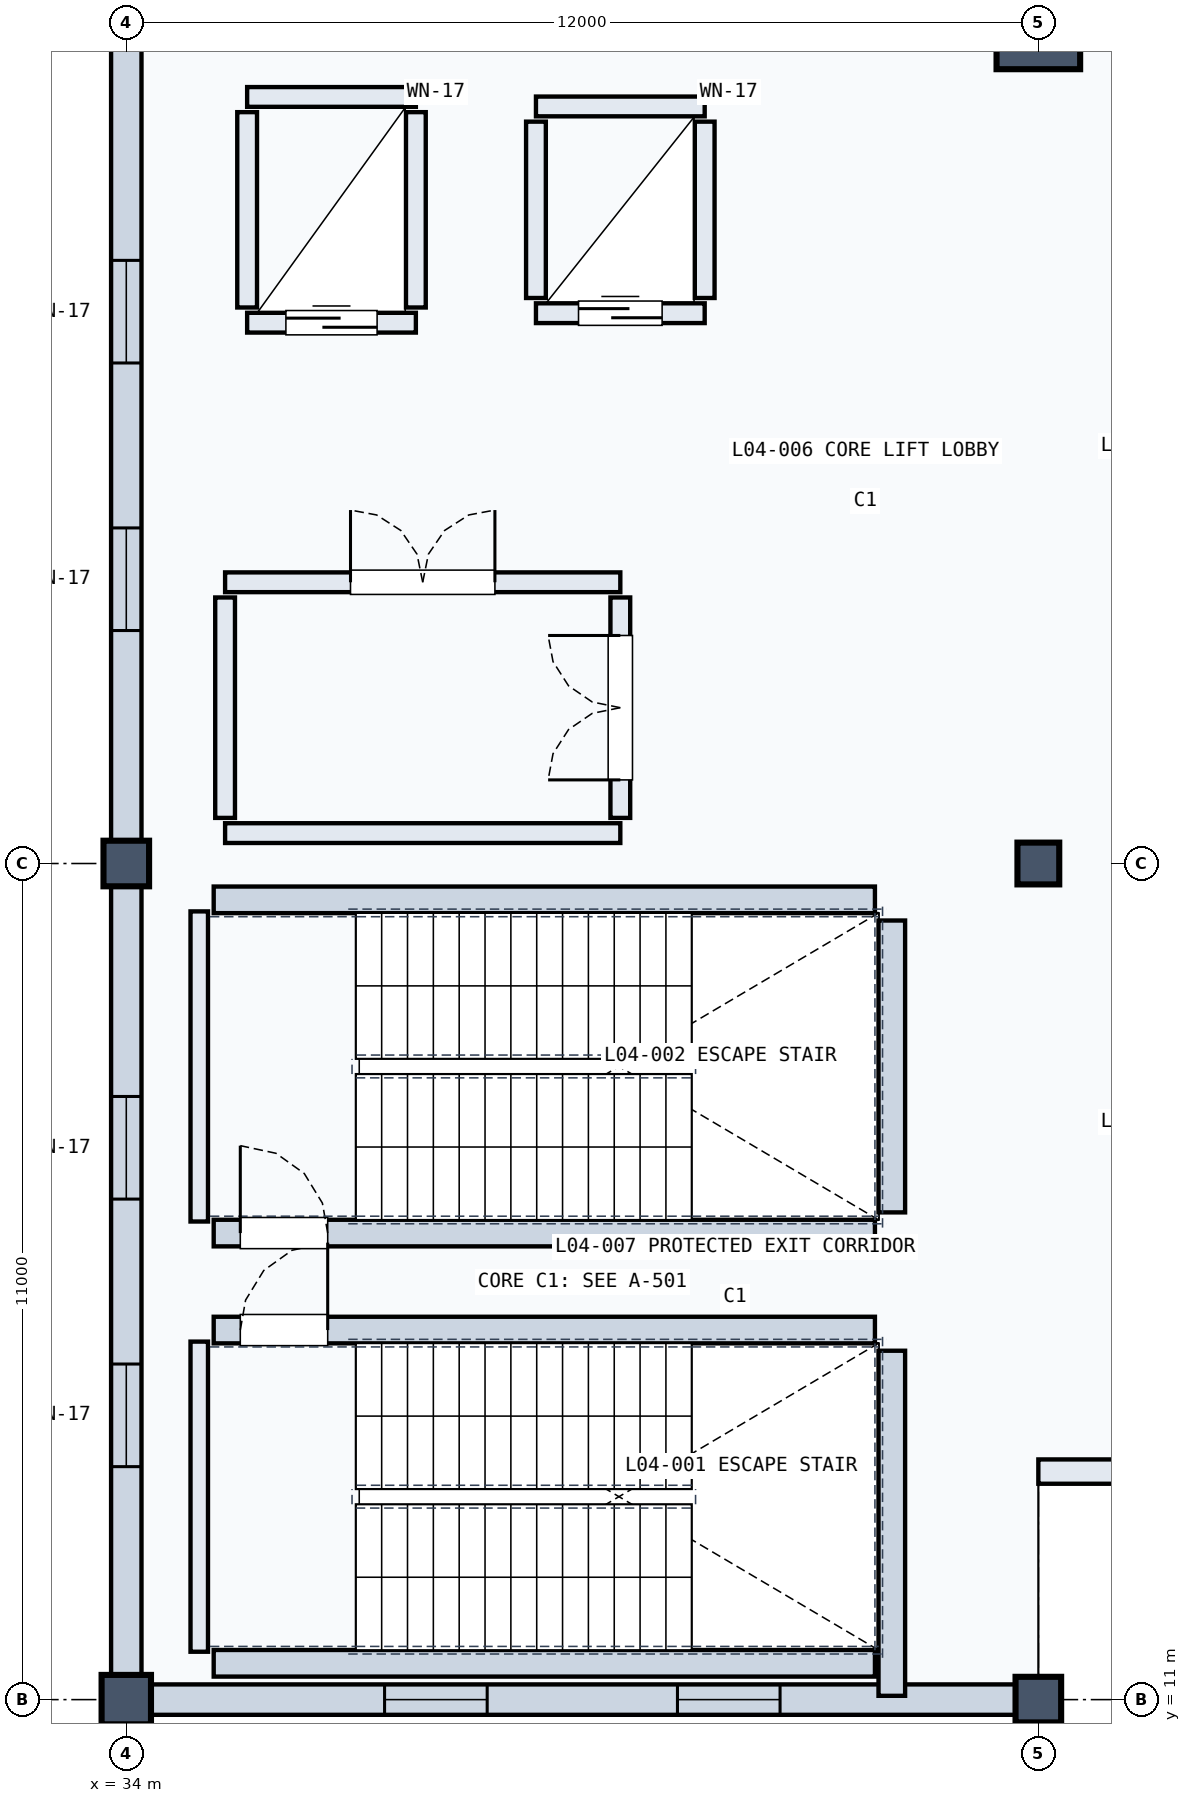
"""IFC4 building model, lengths in metres.
Left out: names, types, materials, properties, quantities, classifications, styles, units other than length and angle.
Written with IfcOpenShell. Run it as: python <this file> out.ifc"""

import sys

from ifc_helpers import new_model, si_unit, direction, frame, frame_2d, origin, origin_2d, place, context, subcontext, project, spatial, rectangle, extrude, element, fill, save


model = new_model("IFC4")
c1 = context("Model", 3, precision=1e-05, world=origin(), true_north=direction((0.0, 1.0)))
c2 = subcontext(c1, "Body", "Model", "MODEL_VIEW")
j1 = project(units=[si_unit("LENGTHUNIT", "METRE"), si_unit("PLANEANGLEUNIT", "RADIAN")], contexts=[c1])
p1 = place(None, origin())
s1 = spatial("IfcSite", under=j1, at=p1, CompositionType="ELEMENT")
p2 = place(p1, origin())
s2 = spatial("IfcBuilding", under=s1, at=p2, CompositionType="ELEMENT")
p3 = place(p2, frame((0.0, 0.0, 19.5)))
s3 = spatial("IfcBuildingStorey", under=s2, at=p3, CompositionType="ELEMENT", Elevation=19.5)
p4 = place(p3, frame((34.0, 11.0, 0.0), z_axis=(0.0, 0.0, 1.0), x_axis=(1.0, 0.0, 0.0)))
e1 = element("IfcColumn", 1, at=p4, inside=s3, PredefinedType="COLUMN", context=c2, shape_type="SweptSolid", body=[
    extrude(rectangle(XDim=0.65, YDim=0.65, at=origin_2d()), origin(), (0.0, 0.0, 1.0), 4.8),
])
for number, where, z_axis, x_axis in (
    (2, (34.0, 22.0, 0.0), (0.0, 0.0, 1.0), (1.0, 0.0, 0.0)),
    (3, (46.0, 11.0, 0.0), (0.0, 0.0, 1.0), (1.0, 0.0, 0.0)),
):
    element("IfcColumn", number, at=place(p3, frame(where, z_axis=z_axis, x_axis=x_axis)), inside=s3, PredefinedType="COLUMN", context=c2, shape_type="SweptSolid", body=[
        extrude(rectangle(XDim=0.6, YDim=0.6, at=origin_2d()), origin(), (0.0, 0.0, 1.0), 4.8),
    ])
p5 = place(p3, frame((46.0, 22.0, 0.0), z_axis=(0.0, 0.0, 1.0), x_axis=(1.0, 0.0, 0.0)))
e4 = element("IfcColumn", 4, at=p5, inside=s3, PredefinedType="COLUMN", context=c2, shape_type="SweptSolid", body=[
    extrude(rectangle(XDim=0.55, YDim=0.55, at=origin_2d()), origin(), (0.0, 0.0, 1.0), 4.8),
])
p6 = place(p3, frame((46.0, 33.0, 0.0), z_axis=(0.0, 0.0, 1.0), x_axis=(1.0, 0.0, 0.0)))
e5 = element("IfcColumn", 5, at=p6, inside=s3, PredefinedType="COLUMN", context=c2, shape_type="SweptSolid", body=[
    extrude(rectangle(XDim=1.1, YDim=1.1, at=origin_2d()), origin(), (0.0, 0.0, 1.0), 4.8),
])
p7 = place(p3, frame((34.22, 11.0, 0.0), z_axis=(0.0, 0.0, 1.0), x_axis=(1.0, 0.0, 0.0)))
e6 = element("IfcWall", 6, at=p7, inside=s3, PredefinedType="SOLIDWALL", context=c2, shape_type="SweptSolid", body=[
    extrude(rectangle(XDim=11.56, YDim=0.4, at=frame_2d((5.78, 0.0))), origin(), (0.0, 0.0, 1.0), 3.707),
])
p8 = place(p7, frame((3.178, 0.0, 0.8)))
e7 = element("IfcOpeningElement", 7, at=p8, cuts=e6, PredefinedType="OPENING", context=c2, shape_type="SweptSolid", body=[
    extrude(rectangle(XDim=1.35, YDim=2.1, at=frame_2d((0.675, 1.05))), frame((0.0, 0.21, 0.0), z_axis=(0.0, -1.0, 0.0), x_axis=(1.0, 0.0, 0.0)), (0.0, 0.0, 1.0), 0.42),
])
p9 = place(p7, frame((7.032, 0.0, 0.8)))
e8 = element("IfcOpeningElement", 8, at=p9, cuts=e6, PredefinedType="OPENING", context=c2, shape_type="SweptSolid", body=[
    extrude(rectangle(XDim=1.35, YDim=2.1, at=frame_2d((0.675, 1.05))), frame((0.0, 0.21, 0.0), z_axis=(0.0, -1.0, 0.0), x_axis=(1.0, 0.0, 0.0)), (0.0, 0.0, 1.0), 0.42),
])
p10 = place(p3, frame((34.0, 11.22, 0.0), z_axis=(0.0, 0.0, 1.0), x_axis=(0.0, 1.0, 0.0)))
e9 = element("IfcWall", 9, at=p10, inside=s3, PredefinedType="SOLIDWALL", context=c2, shape_type="SweptSolid", body=[
    extrude(rectangle(XDim=10.56, YDim=0.4, at=frame_2d((5.28, 0.0))), origin(), (0.0, 0.0, 1.0), 3.49),
])
p11 = place(p10, frame((2.845, 0.0, 0.8)))
e10 = element("IfcOpeningElement", 10, at=p11, cuts=e9, PredefinedType="OPENING", context=c2, shape_type="SweptSolid", body=[
    extrude(rectangle(XDim=1.35, YDim=2.1, at=frame_2d((0.675, 1.05))), frame((0.0, 0.21, 0.0), z_axis=(0.0, -1.0, 0.0), x_axis=(1.0, 0.0, 0.0)), (0.0, 0.0, 1.0), 0.42),
])
p12 = place(p10, frame((6.365, 0.0, 0.8)))
e11 = element("IfcOpeningElement", 11, at=p12, cuts=e9, PredefinedType="OPENING", context=c2, shape_type="SweptSolid", body=[
    extrude(rectangle(XDim=1.35, YDim=2.1, at=frame_2d((0.675, 1.05))), frame((0.0, 0.21, 0.0), z_axis=(0.0, -1.0, 0.0), x_axis=(1.0, 0.0, 0.0)), (0.0, 0.0, 1.0), 0.42),
])
p13 = place(p3, frame((34.0, 22.22, 0.0), z_axis=(0.0, 0.0, 1.0), x_axis=(0.0, 1.0, 0.0)))
e12 = element("IfcWall", 12, at=p13, inside=s3, PredefinedType="SOLIDWALL", context=c2, shape_type="SweptSolid", body=[
    extrude(rectangle(XDim=10.56, YDim=0.4, at=frame_2d((5.28, 0.0))), origin(), (0.0, 0.0, 1.0), 3.49),
])
p14 = place(p13, frame((2.845, 0.0, 0.8)))
e13 = element("IfcOpeningElement", 13, at=p14, cuts=e12, PredefinedType="OPENING", context=c2, shape_type="SweptSolid", body=[
    extrude(rectangle(XDim=1.35, YDim=2.1, at=frame_2d((0.675, 1.05))), frame((0.0, 0.21, 0.0), z_axis=(0.0, -1.0, 0.0), x_axis=(1.0, 0.0, 0.0)), (0.0, 0.0, 1.0), 0.42),
])
p15 = place(p13, frame((6.365, 0.0, 0.8)))
e14 = element("IfcOpeningElement", 14, at=p15, cuts=e12, PredefinedType="OPENING", context=c2, shape_type="SweptSolid", body=[
    extrude(rectangle(XDim=1.35, YDim=2.1, at=frame_2d((0.675, 1.05))), frame((0.0, 0.21, 0.0), z_axis=(0.0, -1.0, 0.0), x_axis=(1.0, 0.0, 0.0)), (0.0, 0.0, 1.0), 0.42),
])
p16 = place(p3, frame((46.0, 14.0, 0.0), z_axis=(0.0, 0.0, 1.0), x_axis=(1.0, 0.0, 0.0)))
e15 = element("IfcWall", 15, at=p16, inside=s3, PredefinedType="SOLIDWALL", context=c2, shape_type="SweptSolid", body=[
    extrude(rectangle(XDim=8.574, YDim=0.32, at=frame_2d((4.287, 0.0))), origin(), (0.0, 0.0, 1.0), 3.707),
])
p17 = place(p16, frame((2.158, 0.0, 0.95)))
e16 = element("IfcOpeningElement", 16, at=p17, cuts=e15, PredefinedType="OPENING", context=c2, shape_type="SweptSolid", body=[
    extrude(rectangle(XDim=1.4, YDim=1.5, at=frame_2d((0.7, 0.75))), frame((0.0, 0.17, 0.0), z_axis=(0.0, -1.0, 0.0), x_axis=(1.0, 0.0, 0.0)), (0.0, 0.0, 1.0), 0.34),
])
p18 = place(p16, frame((5.016, 0.0, 0.95)))
e17 = element("IfcOpeningElement", 17, at=p18, cuts=e15, PredefinedType="OPENING", context=c2, shape_type="SweptSolid", body=[
    extrude(rectangle(XDim=1.4, YDim=1.5, at=frame_2d((0.7, 0.75))), frame((0.0, 0.17, 0.0), z_axis=(0.0, -1.0, 0.0), x_axis=(1.0, 0.0, 0.0)), (0.0, 0.0, 1.0), 0.34),
])
p19 = place(p3, frame((34.96, 11.63, 0.0), z_axis=(0.0, 0.0, 1.0), x_axis=(0.0, 1.0, 0.0)))
e18 = element("IfcWall", 18, at=p19, inside=s3, PredefinedType="SOLIDWALL", context=c2, shape_type="SweptSolid", body=[
    extrude(rectangle(XDim=4.08, YDim=0.23, at=frame_2d((2.04, 0.0))), origin(), (0.0, 0.0, 1.0), 4.46),
])
p20 = place(p3, frame((44.072, 11.05, 0.0), z_axis=(0.0, 0.0, 1.0), x_axis=(0.0, 1.0, 0.0)))
e19 = element("IfcWall", 19, at=p20, inside=s3, PredefinedType="SOLIDWALL", context=c2, shape_type="SweptSolid", body=[
    extrude(rectangle(XDim=4.54, YDim=0.35, at=frame_2d((2.27, 0.0))), origin(), (0.0, 0.0, 1.0), 4.46),
])
p21 = place(p3, frame((35.15, 11.478, 0.0), z_axis=(0.0, 0.0, 1.0), x_axis=(1.0, 0.0, 0.0)))
e20 = element("IfcWall", 20, at=p21, inside=s3, PredefinedType="SOLIDWALL", context=c2, shape_type="SweptSolid", body=[
    extrude(rectangle(XDim=8.7, YDim=0.35, at=frame_2d((4.35, 0.0))), origin(), (0.0, 0.0, 1.0), 4.46),
])
p22 = place(p3, frame((35.15, 15.862, 0.0), z_axis=(0.0, 0.0, 1.0), x_axis=(1.0, 0.0, 0.0)))
e21 = element("IfcWall", 21, at=p22, inside=s3, PredefinedType="SOLIDWALL", context=c2, shape_type="SweptSolid", body=[
    extrude(rectangle(XDim=8.7, YDim=0.35, at=frame_2d((4.35, 0.0))), origin(), (0.0, 0.0, 1.0), 4.46),
])
p23 = place(p22, frame((0.35, 0.0, 0.0)))
e22 = element("IfcOpeningElement", 22, at=p23, cuts=e21, PredefinedType="OPENING", context=c2, shape_type="SweptSolid", body=[
    extrude(rectangle(XDim=1.15, YDim=2.2, at=frame_2d((0.575, 1.1))), frame((0.0, 0.185, 0.0), z_axis=(0.0, -1.0, 0.0), x_axis=(1.0, 0.0, 0.0)), (0.0, 0.0, 1.0), 0.37),
])
p24 = place(p3, frame((34.96, 17.29, 0.0), z_axis=(0.0, 0.0, 1.0), x_axis=(0.0, 1.0, 0.0)))
e23 = element("IfcWall", 23, at=p24, inside=s3, PredefinedType="SOLIDWALL", context=c2, shape_type="SweptSolid", body=[
    extrude(rectangle(XDim=4.08, YDim=0.23, at=frame_2d((2.04, 0.0))), origin(), (0.0, 0.0, 1.0), 4.46),
])
p25 = place(p3, frame((44.072, 17.41, 0.0), z_axis=(0.0, 0.0, 1.0), x_axis=(0.0, 1.0, 0.0)))
e24 = element("IfcWall", 24, at=p25, inside=s3, PredefinedType="SOLIDWALL", context=c2, shape_type="SweptSolid", body=[
    extrude(rectangle(XDim=3.84, YDim=0.35, at=frame_2d((1.92, 0.0))), origin(), (0.0, 0.0, 1.0), 4.46),
])
p26 = place(p3, frame((35.15, 17.138, 0.0), z_axis=(0.0, 0.0, 1.0), x_axis=(1.0, 0.0, 0.0)))
e25 = element("IfcWall", 25, at=p26, inside=s3, PredefinedType="SOLIDWALL", context=c2, shape_type="SweptSolid", body=[
    extrude(rectangle(XDim=8.7, YDim=0.35, at=frame_2d((4.35, 0.0))), origin(), (0.0, 0.0, 1.0), 4.46),
])
p27 = place(p26, frame((0.35, 0.0, 0.0)))
e26 = element("IfcOpeningElement", 26, at=p27, cuts=e25, PredefinedType="OPENING", context=c2, shape_type="SweptSolid", body=[
    extrude(rectangle(XDim=1.15, YDim=2.2, at=frame_2d((0.575, 1.1))), frame((0.0, 0.185, 0.0), z_axis=(0.0, -1.0, 0.0), x_axis=(1.0, 0.0, 0.0)), (0.0, 0.0, 1.0), 0.37),
])
p28 = place(p3, frame((35.15, 21.522, 0.0), z_axis=(0.0, 0.0, 1.0), x_axis=(1.0, 0.0, 0.0)))
e27 = element("IfcWall", 27, at=p28, inside=s3, PredefinedType="SOLIDWALL", context=c2, shape_type="SweptSolid", body=[
    extrude(rectangle(XDim=8.7, YDim=0.35, at=frame_2d((4.35, 0.0))), origin(), (0.0, 0.0, 1.0), 4.46),
])
p29 = place(p3, frame((35.59, 29.115, 0.0), z_axis=(0.0, 0.0, 1.0), x_axis=(1.0, 0.0, 0.0)))
e28 = element("IfcWall", 28, at=p29, inside=s3, PredefinedType="SOLIDWALL", context=c2, shape_type="SweptSolid", body=[
    extrude(rectangle(XDim=2.22, YDim=0.26, at=frame_2d((1.11, 0.0))), origin(), (0.0, 0.0, 1.0), 4.46),
])
p30 = place(p29, frame((0.51, 0.0, 0.0)))
e29 = element("IfcOpeningElement", 29, at=p30, cuts=e28, PredefinedType="OPENING", context=c2, shape_type="SweptSolid", body=[
    extrude(rectangle(XDim=1.2, YDim=2.2, at=frame_2d((0.6, 1.1))), frame((0.0, 0.14, 0.0), z_axis=(0.0, -1.0, 0.0), x_axis=(1.0, 0.0, 0.0)), (0.0, 0.0, 1.0), 0.28),
])
p31 = place(p3, frame((35.59, 32.085, 0.0), z_axis=(0.0, 0.0, 1.0), x_axis=(1.0, 0.0, 0.0)))
e30 = element("IfcWall", 30, at=p31, inside=s3, PredefinedType="SOLIDWALL", context=c2, shape_type="SweptSolid", body=[
    extrude(rectangle(XDim=2.22, YDim=0.26, at=frame_2d((1.11, 0.0))), origin(), (0.0, 0.0, 1.0), 4.46),
])
for number, where, z_axis, x_axis in (
    (31, (35.59, 29.315, 0.0), (0.0, 0.0, 1.0), (0.0, 1.0, 0.0)),
    (32, (37.81, 29.315, 0.0), (0.0, 0.0, 1.0), (0.0, 1.0, 0.0)),
):
    element("IfcWall", number, at=place(p3, frame(where, z_axis=z_axis, x_axis=x_axis)), inside=s3, PredefinedType="SOLIDWALL", context=c2, shape_type="SweptSolid", body=[
        extrude(rectangle(XDim=2.57, YDim=0.26, at=frame_2d((1.285, 0.0))), origin(), (0.0, 0.0, 1.0), 4.46),
    ])
p32 = place(p3, frame((39.39, 29.24, 0.0), z_axis=(0.0, 0.0, 1.0), x_axis=(1.0, 0.0, 0.0)))
e33 = element("IfcWall", 33, at=p32, inside=s3, PredefinedType="SOLIDWALL", context=c2, shape_type="SweptSolid", body=[
    extrude(rectangle(XDim=2.22, YDim=0.26, at=frame_2d((1.11, 0.0))), origin(), (0.0, 0.0, 1.0), 4.46),
])
p33 = place(p32, frame((0.56, 0.0, 0.0)))
e34 = element("IfcOpeningElement", 34, at=p33, cuts=e33, PredefinedType="OPENING", context=c2, shape_type="SweptSolid", body=[
    extrude(rectangle(XDim=1.1, YDim=2.15, at=frame_2d((0.55, 1.075))), frame((0.0, 0.14, 0.0), z_axis=(0.0, -1.0, 0.0), x_axis=(1.0, 0.0, 0.0)), (0.0, 0.0, 1.0), 0.28),
])
p34 = place(p3, frame((39.39, 31.96, 0.0), z_axis=(0.0, 0.0, 1.0), x_axis=(1.0, 0.0, 0.0)))
e35 = element("IfcWall", 35, at=p34, inside=s3, PredefinedType="SOLIDWALL", context=c2, shape_type="SweptSolid", body=[
    extrude(rectangle(XDim=2.22, YDim=0.26, at=frame_2d((1.11, 0.0))), origin(), (0.0, 0.0, 1.0), 4.46),
])
for number, where, z_axis, x_axis in (
    (36, (39.39, 29.44, 0.0), (0.0, 0.0, 1.0), (0.0, 1.0, 0.0)),
    (37, (41.61, 29.44, 0.0), (0.0, 0.0, 1.0), (0.0, 1.0, 0.0)),
):
    element("IfcWall", number, at=place(p3, frame(where, z_axis=z_axis, x_axis=x_axis)), inside=s3, PredefinedType="SOLIDWALL", context=c2, shape_type="SweptSolid", body=[
        extrude(rectangle(XDim=2.32, YDim=0.26, at=frame_2d((1.16, 0.0))), origin(), (0.0, 0.0, 1.0), 4.46),
    ])
p35 = place(p3, frame((35.3, 25.7, 0.0), z_axis=(0.0, 0.0, 1.0), x_axis=(1.0, 0.0, 0.0)))
e38 = element("IfcWall", 38, at=p35, inside=s3, PredefinedType="SOLIDWALL", context=c2, shape_type="SweptSolid", body=[
    extrude(rectangle(XDim=5.2, YDim=0.26, at=frame_2d((2.6, 0.0))), origin(), (0.0, 0.0, 1.0), 4.46),
])
p36 = place(p35, frame((1.65, 0.0, 0.0)))
e39 = element("IfcOpeningElement", 39, at=p36, cuts=e38, PredefinedType="OPENING", context=c2, shape_type="SweptSolid", body=[
    extrude(rectangle(XDim=1.9, YDim=2.2, at=frame_2d((0.95, 1.1))), frame((0.0, 0.14, 0.0), z_axis=(0.0, -1.0, 0.0), x_axis=(1.0, 0.0, 0.0)), (0.0, 0.0, 1.0), 0.28),
])
p37 = place(p3, frame((35.3, 22.4, 0.0), z_axis=(0.0, 0.0, 1.0), x_axis=(1.0, 0.0, 0.0)))
e40 = element("IfcWall", 40, at=p37, inside=s3, PredefinedType="SOLIDWALL", context=c2, shape_type="SweptSolid", body=[
    extrude(rectangle(XDim=5.2, YDim=0.26, at=frame_2d((2.6, 0.0))), origin(), (0.0, 0.0, 1.0), 3.49),
])
p38 = place(p3, frame((35.3, 22.6, 0.0), z_axis=(0.0, 0.0, 1.0), x_axis=(0.0, 1.0, 0.0)))
e41 = element("IfcWall", 41, at=p38, inside=s3, PredefinedType="SOLIDWALL", context=c2, shape_type="SweptSolid", body=[
    extrude(rectangle(XDim=2.9, YDim=0.26, at=frame_2d((1.45, 0.0))), origin(), (0.0, 0.0, 1.0), 4.46),
])
p39 = place(p3, frame((40.5, 22.6, 0.0), z_axis=(0.0, 0.0, 1.0), x_axis=(0.0, 1.0, 0.0)))
e42 = element("IfcWall", 42, at=p39, inside=s3, PredefinedType="SOLIDWALL", context=c2, shape_type="SweptSolid", body=[
    extrude(rectangle(XDim=2.9, YDim=0.26, at=frame_2d((1.45, 0.0))), origin(), (0.0, 0.0, 1.0), 4.46),
])
p40 = place(p39, frame((0.5, 0.0, 0.0)))
e43 = element("IfcOpeningElement", 43, at=p40, cuts=e42, PredefinedType="OPENING", context=c2, shape_type="SweptSolid", body=[
    extrude(rectangle(XDim=1.9, YDim=2.2, at=frame_2d((0.95, 1.1))), frame((0.0, 0.14, 0.0), z_axis=(0.0, -1.0, 0.0), x_axis=(1.0, 0.0, 0.0)), (0.0, 0.0, 1.0), 0.28),
])
p41 = place(p8, origin())
e44 = element("IfcWindow", 44, at=p41, inside=s3, PartitioningType="SINGLE_PANEL", PredefinedType="WINDOW", context=c2, shape_type="SweptSolid", body=[
    extrude(rectangle(XDim=1.35, YDim=2.1, at=frame_2d((0.675, 1.05))), frame((0.0, 0.03, 0.0), z_axis=(0.0, -1.0, 0.0), x_axis=(1.0, 0.0, 0.0)), (0.0, 0.0, 1.0), 0.06),
])
fill(e7, e44)
p42 = place(p9, origin())
e45 = element("IfcWindow", 45, at=p42, inside=s3, PartitioningType="SINGLE_PANEL", PredefinedType="WINDOW", context=c2, shape_type="SweptSolid", body=[
    extrude(rectangle(XDim=1.35, YDim=2.1, at=frame_2d((0.675, 1.05))), frame((0.0, 0.03, 0.0), z_axis=(0.0, -1.0, 0.0), x_axis=(1.0, 0.0, 0.0)), (0.0, 0.0, 1.0), 0.06),
])
fill(e8, e45)
p43 = place(p11, origin())
e46 = element("IfcWindow", 46, at=p43, inside=s3, PartitioningType="SINGLE_PANEL", PredefinedType="WINDOW", context=c2, shape_type="SweptSolid", body=[
    extrude(rectangle(XDim=1.35, YDim=2.1, at=frame_2d((0.675, 1.05))), frame((0.0, 0.03, 0.0), z_axis=(0.0, -1.0, 0.0), x_axis=(1.0, 0.0, 0.0)), (0.0, 0.0, 1.0), 0.06),
])
fill(e10, e46)
p44 = place(p12, origin())
e47 = element("IfcWindow", 47, at=p44, inside=s3, PartitioningType="SINGLE_PANEL", PredefinedType="WINDOW", context=c2, shape_type="SweptSolid", body=[
    extrude(rectangle(XDim=1.35, YDim=2.1, at=frame_2d((0.675, 1.05))), frame((0.0, 0.03, 0.0), z_axis=(0.0, -1.0, 0.0), x_axis=(1.0, 0.0, 0.0)), (0.0, 0.0, 1.0), 0.06),
])
fill(e11, e47)
p45 = place(p14, origin())
e48 = element("IfcWindow", 48, at=p45, inside=s3, PartitioningType="SINGLE_PANEL", PredefinedType="WINDOW", context=c2, shape_type="SweptSolid", body=[
    extrude(rectangle(XDim=1.35, YDim=2.1, at=frame_2d((0.675, 1.05))), frame((0.0, 0.03, 0.0), z_axis=(0.0, -1.0, 0.0), x_axis=(1.0, 0.0, 0.0)), (0.0, 0.0, 1.0), 0.06),
])
fill(e13, e48)
p46 = place(p15, origin())
e49 = element("IfcWindow", 49, at=p46, inside=s3, PartitioningType="SINGLE_PANEL", PredefinedType="WINDOW", context=c2, shape_type="SweptSolid", body=[
    extrude(rectangle(XDim=1.35, YDim=2.1, at=frame_2d((0.675, 1.05))), frame((0.0, 0.03, 0.0), z_axis=(0.0, -1.0, 0.0), x_axis=(1.0, 0.0, 0.0)), (0.0, 0.0, 1.0), 0.06),
])
fill(e14, e49)
p47 = place(p23, origin())
e50 = element("IfcDoor", 50, at=p47, inside=s3, OperationType="SINGLE_SWING_RIGHT", PredefinedType="DOOR", context=c2, shape_type="SweptSolid", body=[
    extrude(rectangle(XDim=1.15, YDim=2.2, at=frame_2d((0.575, 1.1))), frame((0.0, 0.025, 0.0), z_axis=(0.0, -1.0, 0.0), x_axis=(1.0, 0.0, 0.0)), (0.0, 0.0, 1.0), 0.05),
])
fill(e22, e50)
p48 = place(p27, origin())
e51 = element("IfcDoor", 51, at=p48, inside=s3, OperationType="SINGLE_SWING_LEFT", PredefinedType="DOOR", context=c2, shape_type="SweptSolid", body=[
    extrude(rectangle(XDim=1.15, YDim=2.2, at=frame_2d((0.575, 1.1))), frame((0.0, 0.025, 0.0), z_axis=(0.0, -1.0, 0.0), x_axis=(1.0, 0.0, 0.0)), (0.0, 0.0, 1.0), 0.05),
])
fill(e26, e51)
p49 = place(p30, origin())
e52 = element("IfcDoor", 52, at=p49, inside=s3, OperationType="SLIDING_TO_LEFT", PredefinedType="DOOR", context=c2, shape_type="SweptSolid", body=[
    extrude(rectangle(XDim=1.2, YDim=2.2, at=frame_2d((0.6, 1.1))), frame((0.0, 0.025, 0.0), z_axis=(0.0, -1.0, 0.0), x_axis=(1.0, 0.0, 0.0)), (0.0, 0.0, 1.0), 0.05),
])
fill(e29, e52)
p50 = place(p33, origin())
e53 = element("IfcDoor", 53, at=p50, inside=s3, OperationType="SLIDING_TO_LEFT", PredefinedType="DOOR", context=c2, shape_type="SweptSolid", body=[
    extrude(rectangle(XDim=1.1, YDim=2.15, at=frame_2d((0.55, 1.075))), frame((0.0, 0.025, 0.0), z_axis=(0.0, -1.0, 0.0), x_axis=(1.0, 0.0, 0.0)), (0.0, 0.0, 1.0), 0.05),
])
fill(e34, e53)
p51 = place(p36, origin())
e54 = element("IfcDoor", 54, at=p51, inside=s3, OperationType="DOUBLE_DOOR_SINGLE_SWING", PredefinedType="DOOR", context=c2, shape_type="SweptSolid", body=[
    extrude(rectangle(XDim=1.9, YDim=2.2, at=frame_2d((0.95, 1.1))), frame((0.0, 0.025, 0.0), z_axis=(0.0, -1.0, 0.0), x_axis=(1.0, 0.0, 0.0)), (0.0, 0.0, 1.0), 0.05),
])
fill(e39, e54)
p52 = place(p40, origin())
e55 = element("IfcDoor", 55, at=p52, inside=s3, OperationType="DOUBLE_DOOR_SINGLE_SWING", PredefinedType="DOOR", context=c2, shape_type="SweptSolid", body=[
    extrude(rectangle(XDim=1.9, YDim=2.2, at=frame_2d((0.95, 1.1))), frame((0.0, 0.025, 0.0), z_axis=(0.0, -1.0, 0.0), x_axis=(1.0, 0.0, 0.0)), (0.0, 0.0, 1.0), 0.05),
])
fill(e43, e55)
save(model, sys.argv[1])
